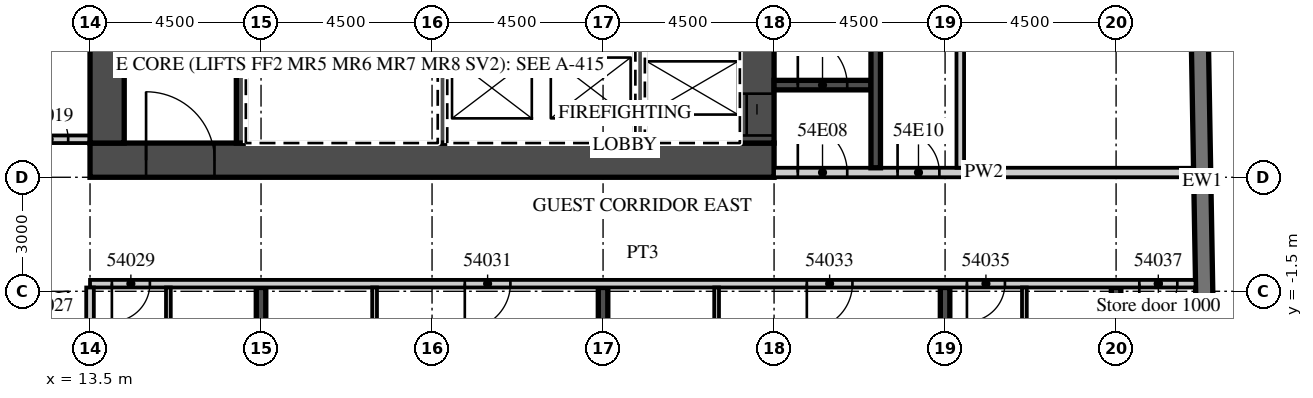
"""IFC4 building model, lengths in metres.
Left out: names, types, materials, properties, quantities, classifications, styles, units other than length and angle.
Written with IfcOpenShell. Run it as: python <this file> out.ifc"""

import sys

from ifc_helpers import new_model, si_unit, direction, frame, frame_2d, origin, place, context, subcontext, project, spatial, rectangle, extrude, element, fill, save


model = new_model("IFC4")
c1 = context("Model", 3, precision=1e-05, world=origin(), true_north=direction((0.0, 1.0)))
c2 = subcontext(c1, "Body", "Model", "MODEL_VIEW")
j1 = project(units=[si_unit("LENGTHUNIT", "METRE"), si_unit("PLANEANGLEUNIT", "RADIAN")], contexts=[c1])
p1 = place(None, origin())
s1 = spatial("IfcSite", under=j1, at=p1, CompositionType="ELEMENT")
p2 = place(p1, origin())
s2 = spatial("IfcBuilding", under=s1, at=p2, CompositionType="ELEMENT")
p3 = place(p2, frame((0.0, 0.0, 224.3)))
s3 = spatial("IfcBuildingStorey", under=s2, at=p3, CompositionType="ELEMENT", Elevation=224.3)
p4 = place(p3, frame((18.0, -19.079, 0.0), z_axis=(0.0, 0.0, 1.0), x_axis=(0.0, 1.0, 0.0)))
e1 = element("IfcWall", 1, at=p4, inside=s3, PredefinedType="SHEAR", context=c2, shape_type="SweptSolid", body=[
    extrude(rectangle(XDim=17.679, YDim=0.25, at=frame_2d((8.84, 0.0))), origin(), (0.0, 0.0, 1.0), 3.3),
])
p5 = place(p3, frame((27.0, -18.922, 0.0), z_axis=(0.0, 0.0, 1.0), x_axis=(0.0, 1.0, 0.0)))
e2 = element("IfcWall", 2, at=p5, inside=s3, PredefinedType="SHEAR", context=c2, shape_type="SweptSolid", body=[
    extrude(rectangle(XDim=17.522, YDim=0.25, at=frame_2d((8.761, 0.0))), origin(), (0.0, 0.0, 1.0), 3.3),
])
p6 = place(p3, frame((36.0, -18.765, 0.0), z_axis=(0.0, 0.0, 1.0), x_axis=(0.0, 1.0, 0.0)))
e3 = element("IfcWall", 3, at=p6, inside=s3, PredefinedType="SHEAR", context=c2, shape_type="SweptSolid", body=[
    extrude(rectangle(XDim=17.365, YDim=0.25, at=frame_2d((8.683, 0.0))), origin(), (0.0, 0.0, 1.0), 3.3),
])
p7 = place(p3, frame((40.5, -18.325, 0.0), z_axis=(0.0, 0.0, 1.0), x_axis=(0.0, 1.0, 0.0)))
e4 = element("IfcWall", 4, at=p7, inside=s3, PredefinedType="SHEAR", context=c2, shape_type="SweptSolid", body=[
    extrude(rectangle(XDim=16.925, YDim=0.25, at=frame_2d((8.463, 0.0))), origin(), (0.0, 0.0, 1.0), 3.3),
])
p8 = place(p3, frame((43.057, -15.103, 0.0), z_axis=(0.0, 0.0, 1.0), x_axis=(-0.017452408953, 0.999847695112, 0.0)))
e5 = element("IfcWall", 5, at=p8, inside=s3, PredefinedType="SOLIDWALL", context=c2, shape_type="SweptSolid", body=[
    extrude(rectangle(XDim=33.0, YDim=0.45, at=frame_2d((16.5, 0.0))), origin(), (0.0, 0.0, 1.0), 3.02),
])
p9 = place(p3, frame((-13.5, 2.5, 0.0), z_axis=(0.0, 0.0, 1.0), x_axis=(1.0, 0.0, 0.0)))
e6 = element("IfcWall", 6, at=p9, inside=s3, PredefinedType="PARTITIONING", context=c2, shape_type="SweptSolid", body=[
    extrude(rectangle(XDim=27.0, YDim=0.2, at=frame_2d((13.5, 0.0))), origin(), (0.0, 0.0, 1.0), 3.02),
])
p10 = place(p9, frame((2.925, 0.0, 0.0)))
e7 = element("IfcOpeningElement", 7, at=p10, cuts=e6, PredefinedType="OPENING", context=c2, shape_type="SweptSolid", body=[
    extrude(rectangle(XDim=1.0, YDim=2.1, at=frame_2d((0.5, 1.05))), frame((0.0, 0.11, 0.0), z_axis=(0.0, -1.0, 0.0), x_axis=(1.0, 0.0, 0.0)), (0.0, 0.0, 1.0), 0.22),
])
p11 = place(p9, frame((7.45, 0.0, 0.0)))
e8 = element("IfcOpeningElement", 8, at=p11, cuts=e6, PredefinedType="OPENING", context=c2, shape_type="SweptSolid", body=[
    extrude(rectangle(XDim=1.0, YDim=2.1, at=frame_2d((0.5, 1.05))), frame((0.0, 0.11, 0.0), z_axis=(0.0, -1.0, 0.0), x_axis=(1.0, 0.0, 0.0)), (0.0, 0.0, 1.0), 0.22),
])
p12 = place(p9, frame((11.925, 0.0, 0.0)))
e9 = element("IfcOpeningElement", 9, at=p12, cuts=e6, PredefinedType="OPENING", context=c2, shape_type="SweptSolid", body=[
    extrude(rectangle(XDim=1.0, YDim=2.1, at=frame_2d((0.5, 1.05))), frame((0.0, 0.11, 0.0), z_axis=(0.0, -1.0, 0.0), x_axis=(1.0, 0.0, 0.0)), (0.0, 0.0, 1.0), 0.22),
])
p13 = place(p9, frame((14.075, 0.0, 0.0)))
e10 = element("IfcOpeningElement", 10, at=p13, cuts=e6, PredefinedType="OPENING", context=c2, shape_type="SweptSolid", body=[
    extrude(rectangle(XDim=1.0, YDim=2.1, at=frame_2d((0.5, 1.05))), frame((0.0, 0.11, 0.0), z_axis=(0.0, -1.0, 0.0), x_axis=(1.0, 0.0, 0.0)), (0.0, 0.0, 1.0), 0.22),
])
p14 = place(p9, frame((20.925, 0.0, 0.0)))
e11 = element("IfcOpeningElement", 11, at=p14, cuts=e6, PredefinedType="OPENING", context=c2, shape_type="SweptSolid", body=[
    extrude(rectangle(XDim=1.0, YDim=2.1, at=frame_2d((0.5, 1.05))), frame((0.0, 0.11, 0.0), z_axis=(0.0, -1.0, 0.0), x_axis=(1.0, 0.0, 0.0)), (0.0, 0.0, 1.0), 0.22),
])
p15 = place(p9, frame((25.425, 0.0, 0.0)))
e12 = element("IfcOpeningElement", 12, at=p15, cuts=e6, PredefinedType="OPENING", context=c2, shape_type="SweptSolid", body=[
    extrude(rectangle(XDim=1.0, YDim=2.1, at=frame_2d((0.5, 1.05))), frame((0.0, 0.11, 0.0), z_axis=(0.0, -1.0, 0.0), x_axis=(1.0, 0.0, 0.0)), (0.0, 0.0, 1.0), 0.22),
])
p16 = place(p3, frame((13.5, -1.3, 0.0), z_axis=(0.0, 0.0, 1.0), x_axis=(1.0, 0.0, 0.0)))
e13 = element("IfcWall", 13, at=p16, inside=s3, PredefinedType="PARTITIONING", context=c2, shape_type="SweptSolid", body=[
    extrude(rectangle(XDim=29.091, YDim=0.2, at=frame_2d((14.545, 0.0))), origin(), (0.0, 0.0, 1.0), 3.02),
])
p17 = place(p16, frame((0.575, 0.0, 0.0)))
e14 = element("IfcOpeningElement", 14, at=p17, cuts=e13, PredefinedType="OPENING", context=c2, shape_type="SweptSolid", body=[
    extrude(rectangle(XDim=1.0, YDim=2.1, at=frame_2d((0.5, 1.05))), frame((0.0, 0.11, 0.0), z_axis=(0.0, -1.0, 0.0), x_axis=(1.0, 0.0, 0.0)), (0.0, 0.0, 1.0), 0.22),
])
p18 = place(p16, frame((9.862, 0.0, 0.0)))
e15 = element("IfcOpeningElement", 15, at=p18, cuts=e13, PredefinedType="OPENING", context=c2, shape_type="SweptSolid", body=[
    extrude(rectangle(XDim=1.2, YDim=2.1, at=frame_2d((0.6, 1.05))), frame((0.0, 0.11, 0.0), z_axis=(0.0, -1.0, 0.0), x_axis=(1.0, 0.0, 0.0)), (0.0, 0.0, 1.0), 0.22),
])
p19 = place(p16, frame((18.862, 0.0, 0.0)))
e16 = element("IfcOpeningElement", 16, at=p19, cuts=e13, PredefinedType="OPENING", context=c2, shape_type="SweptSolid", body=[
    extrude(rectangle(XDim=1.2, YDim=2.1, at=frame_2d((0.6, 1.05))), frame((0.0, 0.11, 0.0), z_axis=(0.0, -1.0, 0.0), x_axis=(1.0, 0.0, 0.0)), (0.0, 0.0, 1.0), 0.22),
])
p20 = place(p16, frame((23.075, 0.0, 0.0)))
e17 = element("IfcOpeningElement", 17, at=p20, cuts=e13, PredefinedType="OPENING", context=c2, shape_type="SweptSolid", body=[
    extrude(rectangle(XDim=1.0, YDim=2.1, at=frame_2d((0.5, 1.05))), frame((0.0, 0.11, 0.0), z_axis=(0.0, -1.0, 0.0), x_axis=(1.0, 0.0, 0.0)), (0.0, 0.0, 1.0), 0.22),
])
p21 = place(p16, frame((27.611, 0.0, 0.0)))
e18 = element("IfcOpeningElement", 18, at=p21, cuts=e13, PredefinedType="OPENING", context=c2, shape_type="SweptSolid", body=[
    extrude(rectangle(XDim=1.0, YDim=2.4, at=frame_2d((0.5, 1.2))), frame((0.0, 0.11, 0.0), z_axis=(0.0, -1.0, 0.0), x_axis=(1.0, 0.0, 0.0)), (0.0, 0.0, 1.0), 0.22),
])
p22 = place(p3, frame((13.5, -19.17, 0.0), z_axis=(0.0, 0.0, 1.0), x_axis=(0.0, 1.0, 0.0)))
e19 = element("IfcWall", 19, at=p22, inside=s3, PredefinedType="PARTITIONING", context=c2, shape_type="SweptSolid", body=[
    extrude(rectangle(XDim=17.77, YDim=0.2, at=frame_2d((8.885, 0.0))), origin(), (0.0, 0.0, 1.0), 3.02),
])
p23 = place(p3, frame((15.562, -8.125, 0.0), z_axis=(0.0, 0.0, 1.0), x_axis=(0.0, 1.0, 0.0)))
e20 = element("IfcWall", 20, at=p23, inside=s3, PredefinedType="PARTITIONING", context=c2, shape_type="SweptSolid", body=[
    extrude(rectangle(XDim=6.725, YDim=0.125, at=frame_2d((3.363, 0.0))), origin(), (0.0, 0.0, 1.0), 3.02),
])
p24 = place(p23, frame((3.375, 0.0, 0.0)))
e21 = element("IfcOpeningElement", 21, at=p24, cuts=e20, PredefinedType="OPENING", context=c2, shape_type="SweptSolid", body=[
    extrude(rectangle(XDim=0.9, YDim=2.1, at=frame_2d((0.45, 1.05))), frame((0.0, 0.073, 0.0), z_axis=(0.0, -1.0, 0.0), x_axis=(1.0, 0.0, 0.0)), (0.0, 0.0, 1.0), 0.145),
])
p25 = place(p3, frame((20.988, -8.125, 0.0), z_axis=(0.0, 0.0, 1.0), x_axis=(0.0, 1.0, 0.0)))
e22 = element("IfcWall", 22, at=p25, inside=s3, PredefinedType="PARTITIONING", context=c2, shape_type="SweptSolid", body=[
    extrude(rectangle(XDim=6.725, YDim=0.125, at=frame_2d((3.363, 0.0))), origin(), (0.0, 0.0, 1.0), 3.02),
])
p26 = place(p25, frame((3.375, 0.0, 0.0)))
e23 = element("IfcOpeningElement", 23, at=p26, cuts=e22, PredefinedType="OPENING", context=c2, shape_type="SweptSolid", body=[
    extrude(rectangle(XDim=0.9, YDim=2.1, at=frame_2d((0.45, 1.05))), frame((0.0, 0.073, 0.0), z_axis=(0.0, -1.0, 0.0), x_axis=(1.0, 0.0, 0.0)), (0.0, 0.0, 1.0), 0.145),
])
p27 = place(p3, frame((29.988, -8.125, 0.0), z_axis=(0.0, 0.0, 1.0), x_axis=(0.0, 1.0, 0.0)))
e24 = element("IfcWall", 24, at=p27, inside=s3, PredefinedType="PARTITIONING", context=c2, shape_type="SweptSolid", body=[
    extrude(rectangle(XDim=6.725, YDim=0.125, at=frame_2d((3.363, 0.0))), origin(), (0.0, 0.0, 1.0), 3.02),
])
p28 = place(p27, frame((3.375, 0.0, 0.0)))
e25 = element("IfcOpeningElement", 25, at=p28, cuts=e24, PredefinedType="OPENING", context=c2, shape_type="SweptSolid", body=[
    extrude(rectangle(XDim=0.9, YDim=2.1, at=frame_2d((0.45, 1.05))), frame((0.0, 0.073, 0.0), z_axis=(0.0, -1.0, 0.0), x_axis=(1.0, 0.0, 0.0)), (0.0, 0.0, 1.0), 0.145),
])
p29 = place(p3, frame((38.087, -8.125, 0.0), z_axis=(0.0, 0.0, 1.0), x_axis=(0.0, 1.0, 0.0)))
e26 = element("IfcWall", 26, at=p29, inside=s3, PredefinedType="PARTITIONING", context=c2, shape_type="SweptSolid", body=[
    extrude(rectangle(XDim=6.725, YDim=0.125, at=frame_2d((3.363, 0.0))), origin(), (0.0, 0.0, 1.0), 3.02),
])
p30 = place(p29, frame((3.375, 0.0, 0.0)))
e27 = element("IfcOpeningElement", 27, at=p30, cuts=e26, PredefinedType="OPENING", context=c2, shape_type="SweptSolid", body=[
    extrude(rectangle(XDim=0.9, YDim=2.1, at=frame_2d((0.45, 1.05))), frame((0.0, 0.073, 0.0), z_axis=(0.0, -1.0, 0.0), x_axis=(1.0, 0.0, 0.0)), (0.0, 0.0, 1.0), 0.145),
])
p31 = place(p3, frame((13.5, 1.95, 0.0), z_axis=(0.0, 0.0, 1.0), x_axis=(1.0, 0.0, 0.0)))
e28 = element("IfcWall", 28, at=p31, inside=s3, PredefinedType="SHEAR", context=c2, shape_type="SweptSolid", body=[
    extrude(rectangle(XDim=18.0, YDim=0.9, at=frame_2d((9.0, 0.0))), origin(), (0.0, 0.0, 1.0), 3.02),
])
p32 = place(p31, frame((1.475, 0.0, 0.0)))
e29 = element("IfcOpeningElement", 29, at=p32, cuts=e28, PredefinedType="OPENING", context=c2, shape_type="SweptSolid", body=[
    extrude(rectangle(XDim=1.8, YDim=2.1, at=frame_2d((0.9, 1.05))), frame((0.0, 0.46, 0.0), z_axis=(0.0, -1.0, 0.0), x_axis=(1.0, 0.0, 0.0)), (0.0, 0.0, 1.0), 0.92),
])
p33 = place(p3, frame((31.05, 2.4, 0.0), z_axis=(0.0, 0.0, 1.0), x_axis=(0.0, 1.0, 0.0)))
e30 = element("IfcWall", 30, at=p33, inside=s3, PredefinedType="SHEAR", context=c2, shape_type="SweptSolid", body=[
    extrude(rectangle(XDim=12.8, YDim=0.9, at=frame_2d((6.4, 0.0))), origin(), (0.0, 0.0, 1.0), 3.02),
])
p34 = place(p33, frame((0.2, 0.0, 0.0)))
e31 = element("IfcOpeningElement", 31, at=p34, cuts=e30, PredefinedType="OPENING", context=c2, shape_type="SweptSolid", body=[
    extrude(rectangle(XDim=1.1, YDim=2.1, at=frame_2d((0.55, 1.05))), frame((0.0, 0.46, 0.0), z_axis=(0.0, -1.0, 0.0), x_axis=(1.0, 0.0, 0.0)), (0.0, 0.0, 1.0), 0.92),
])
p35 = place(p3, frame((13.95, 2.4, 0.0), z_axis=(0.0, 0.0, 1.0), x_axis=(0.0, 1.0, 0.0)))
e32 = element("IfcWall", 32, at=p35, inside=s3, PredefinedType="SHEAR", context=c2, shape_type="SweptSolid", body=[
    extrude(rectangle(XDim=12.2, YDim=0.9, at=frame_2d((6.1, 0.0))), origin(), (0.0, 0.0, 1.0), 3.02),
])
p36 = place(p3, frame((17.475, 2.4, 0.0), z_axis=(0.0, 0.0, 1.0), x_axis=(0.0, 1.0, 0.0)))
e33 = element("IfcWall", 33, at=p36, inside=s3, PredefinedType="SHEAR", context=c2, shape_type="SweptSolid", body=[
    extrude(rectangle(XDim=3.15, YDim=0.25, at=frame_2d((1.575, 0.0))), origin(), (0.0, 0.0, 1.0), 3.02),
])
for number, where, z_axis, x_axis in (
    (34, (27.975, 2.4, 0.0), (0.0, 0.0, 1.0), (0.0, 1.0, 0.0)),
    (35, (22.775, 2.4, 0.0), (0.0, 0.0, 1.0), (0.0, 1.0, 0.0)),
):
    element("IfcWall", number, at=place(p3, frame(where, z_axis=z_axis, x_axis=x_axis)), inside=s3, PredefinedType="SHEAR", context=c2, shape_type="SweptSolid", body=[
        extrude(rectangle(XDim=2.9, YDim=0.25, at=frame_2d((1.45, 0.0))), origin(), (0.0, 0.0, 1.0), 3.02),
    ])
p37 = place(p3, frame((31.5, 1.625, 0.0), z_axis=(0.0, 0.0, 1.0), x_axis=(1.0, 0.0, 0.0)))
e36 = element("IfcWall", 36, at=p37, inside=s3, PredefinedType="PARTITIONING", context=c2, shape_type="SweptSolid", body=[
    extrude(rectangle(XDim=11.04, YDim=0.25, at=frame_2d((5.52, 0.0))), origin(), (0.0, 0.0, 1.0), 3.02),
])
p38 = place(p37, frame((0.625, 0.0, 0.0)))
e37 = element("IfcOpeningElement", 37, at=p38, cuts=e36, PredefinedType="OPENING", context=c2, shape_type="SweptSolid", body=[
    extrude(rectangle(XDim=1.3, YDim=2.1, at=frame_2d((0.65, 1.05))), frame((0.0, 0.135, 0.0), z_axis=(0.0, -1.0, 0.0), x_axis=(1.0, 0.0, 0.0)), (0.0, 0.0, 1.0), 0.27),
])
p39 = place(p37, frame((3.25, 0.0, 0.0)))
e38 = element("IfcOpeningElement", 38, at=p39, cuts=e36, PredefinedType="OPENING", context=c2, shape_type="SweptSolid", body=[
    extrude(rectangle(XDim=1.1, YDim=2.1, at=frame_2d((0.55, 1.05))), frame((0.0, 0.135, 0.0), z_axis=(0.0, -1.0, 0.0), x_axis=(1.0, 0.0, 0.0)), (0.0, 0.0, 1.0), 0.27),
])
p40 = place(p3, frame((31.5, 3.925, 0.0), z_axis=(0.0, 0.0, 1.0), x_axis=(1.0, 0.0, 0.0)))
e39 = element("IfcWall", 39, at=p40, inside=s3, PredefinedType="SHEAR", context=c2, shape_type="SweptSolid", body=[
    extrude(rectangle(XDim=2.55, YDim=0.25, at=frame_2d((1.275, 0.0))), origin(), (0.0, 0.0, 1.0), 3.02),
])
p41 = place(p40, frame((0.625, 0.0, 0.0)))
e40 = element("IfcOpeningElement", 40, at=p41, cuts=e39, PredefinedType="OPENING", context=c2, shape_type="SweptSolid", body=[
    extrude(rectangle(XDim=1.3, YDim=2.1, at=frame_2d((0.65, 1.05))), frame((0.0, 0.135, 0.0), z_axis=(0.0, -1.0, 0.0), x_axis=(1.0, 0.0, 0.0)), (0.0, 0.0, 1.0), 0.27),
])
p42 = place(p3, frame((34.175, 1.75, 0.0), z_axis=(0.0, 0.0, 1.0), x_axis=(0.0, 1.0, 0.0)))
e41 = element("IfcWall", 41, at=p42, inside=s3, PredefinedType="SHEAR", context=c2, shape_type="SweptSolid", body=[
    extrude(rectangle(XDim=8.35, YDim=0.25, at=frame_2d((4.175, 0.0))), origin(), (0.0, 0.0, 1.0), 3.02),
])
p43 = place(p3, frame((36.4, 1.75, 0.0), z_axis=(0.0, 0.0, 1.0), x_axis=(0.0, 1.0, 0.0)))
e42 = element("IfcWall", 42, at=p43, inside=s3, PredefinedType="PARTITIONING", context=c2, shape_type="SweptSolid", body=[
    extrude(rectangle(XDim=15.95, YDim=0.2, at=frame_2d((7.975, 0.0))), origin(), (0.0, 0.0, 1.0), 3.02),
])
p44 = place(p43, frame((14.7, 0.0, 0.0)))
e43 = element("IfcOpeningElement", 43, at=p44, cuts=e42, PredefinedType="OPENING", context=c2, shape_type="SweptSolid", body=[
    extrude(rectangle(XDim=0.9, YDim=2.1, at=frame_2d((0.45, 1.05))), frame((0.0, 0.11, 0.0), z_axis=(0.0, -1.0, 0.0), x_axis=(1.0, 0.0, 0.0)), (0.0, 0.0, 1.0), 0.22),
])
p45 = place(p15, origin())
e44 = element("IfcDoor", 44, at=p45, inside=s3, OperationType="SINGLE_SWING_LEFT", PredefinedType="DOOR", context=c2, shape_type="SweptSolid", body=[
    extrude(rectangle(XDim=1.0, YDim=2.1, at=frame_2d((0.5, 1.05))), frame((0.0, 0.025, 0.0), z_axis=(0.0, -1.0, 0.0), x_axis=(1.0, 0.0, 0.0)), (0.0, 0.0, 1.0), 0.05),
])
fill(e12, e44)
p46 = place(p17, origin())
e45 = element("IfcDoor", 45, at=p46, inside=s3, OperationType="SINGLE_SWING_LEFT", PredefinedType="DOOR", context=c2, shape_type="SweptSolid", body=[
    extrude(rectangle(XDim=1.0, YDim=2.1, at=frame_2d((0.5, 1.05))), frame((0.0, 0.025, 0.0), z_axis=(0.0, -1.0, 0.0), x_axis=(1.0, 0.0, 0.0)), (0.0, 0.0, 1.0), 0.05),
])
fill(e14, e45)
p47 = place(p18, origin())
e46 = element("IfcDoor", 46, at=p47, inside=s3, OperationType="SINGLE_SWING_LEFT", PredefinedType="DOOR", context=c2, shape_type="SweptSolid", body=[
    extrude(rectangle(XDim=1.2, YDim=2.1, at=frame_2d((0.6, 1.05))), frame((0.0, 0.025, 0.0), z_axis=(0.0, -1.0, 0.0), x_axis=(1.0, 0.0, 0.0)), (0.0, 0.0, 1.0), 0.05),
])
fill(e15, e46)
p48 = place(p19, origin())
e47 = element("IfcDoor", 47, at=p48, inside=s3, OperationType="SINGLE_SWING_LEFT", PredefinedType="DOOR", context=c2, shape_type="SweptSolid", body=[
    extrude(rectangle(XDim=1.2, YDim=2.1, at=frame_2d((0.6, 1.05))), frame((0.0, 0.025, 0.0), z_axis=(0.0, -1.0, 0.0), x_axis=(1.0, 0.0, 0.0)), (0.0, 0.0, 1.0), 0.05),
])
fill(e16, e47)
p49 = place(p20, origin())
e48 = element("IfcDoor", 48, at=p49, inside=s3, OperationType="SINGLE_SWING_LEFT", PredefinedType="DOOR", context=c2, shape_type="SweptSolid", body=[
    extrude(rectangle(XDim=1.0, YDim=2.1, at=frame_2d((0.5, 1.05))), frame((0.0, 0.025, 0.0), z_axis=(0.0, -1.0, 0.0), x_axis=(1.0, 0.0, 0.0)), (0.0, 0.0, 1.0), 0.05),
])
fill(e17, e48)
p50 = place(p21, origin())
e49 = element("IfcDoor", 49, at=p50, inside=s3, OperationType="SINGLE_SWING_LEFT", PredefinedType="DOOR", context=c2, shape_type="SweptSolid", body=[
    extrude(rectangle(XDim=1.0, YDim=2.4, at=frame_2d((0.5, 1.2))), frame((0.0, 0.025, 0.0), z_axis=(0.0, -1.0, 0.0), x_axis=(1.0, 0.0, 0.0)), (0.0, 0.0, 1.0), 0.05),
])
fill(e18, e49)
p51 = place(p34, origin())
e50 = element("IfcDoor", 50, at=p51, inside=s3, OperationType="SLIDING_TO_LEFT", PredefinedType="DOOR", context=c2, shape_type="SweptSolid", body=[
    extrude(rectangle(XDim=1.1, YDim=2.1, at=frame_2d((0.55, 1.05))), frame((0.0, 0.025, 0.0), z_axis=(0.0, -1.0, 0.0), x_axis=(1.0, 0.0, 0.0)), (0.0, 0.0, 1.0), 0.05),
])
fill(e31, e50)
p52 = place(p32, origin())
e51 = element("IfcDoor", 51, at=p52, inside=s3, OperationType="DOUBLE_DOOR_DOUBLE_SWING", PredefinedType="DOOR", context=c2, shape_type="SweptSolid", body=[
    extrude(rectangle(XDim=1.8, YDim=2.1, at=frame_2d((0.9, 1.05))), frame((0.0, 0.025, 0.0), z_axis=(0.0, -1.0, 0.0), x_axis=(1.0, 0.0, 0.0)), (0.0, 0.0, 1.0), 0.05),
])
fill(e29, e51)
p53 = place(p38, origin())
e52 = element("IfcDoor", 52, at=p53, inside=s3, OperationType="SINGLE_SWING_LEFT", PredefinedType="DOOR", context=c2, shape_type="SweptSolid", body=[
    extrude(rectangle(XDim=1.3, YDim=2.1, at=frame_2d((0.65, 1.05))), frame((0.0, 0.025, 0.0), z_axis=(0.0, -1.0, 0.0), x_axis=(1.0, 0.0, 0.0)), (0.0, 0.0, 1.0), 0.05),
])
fill(e37, e52)
p54 = place(p41, origin())
e53 = element("IfcDoor", 53, at=p54, inside=s3, OperationType="SINGLE_SWING_LEFT", PredefinedType="DOOR", context=c2, shape_type="SweptSolid", body=[
    extrude(rectangle(XDim=1.3, YDim=2.1, at=frame_2d((0.65, 1.05))), frame((0.0, 0.025, 0.0), z_axis=(0.0, -1.0, 0.0), x_axis=(1.0, 0.0, 0.0)), (0.0, 0.0, 1.0), 0.05),
])
fill(e40, e53)
p55 = place(p39, origin())
e54 = element("IfcDoor", 54, at=p55, inside=s3, OperationType="SINGLE_SWING_LEFT", PredefinedType="DOOR", context=c2, shape_type="SweptSolid", body=[
    extrude(rectangle(XDim=1.1, YDim=2.1, at=frame_2d((0.55, 1.05))), frame((0.0, 0.025, 0.0), z_axis=(0.0, -1.0, 0.0), x_axis=(1.0, 0.0, 0.0)), (0.0, 0.0, 1.0), 0.05),
])
fill(e38, e54)
save(model, sys.argv[1])
